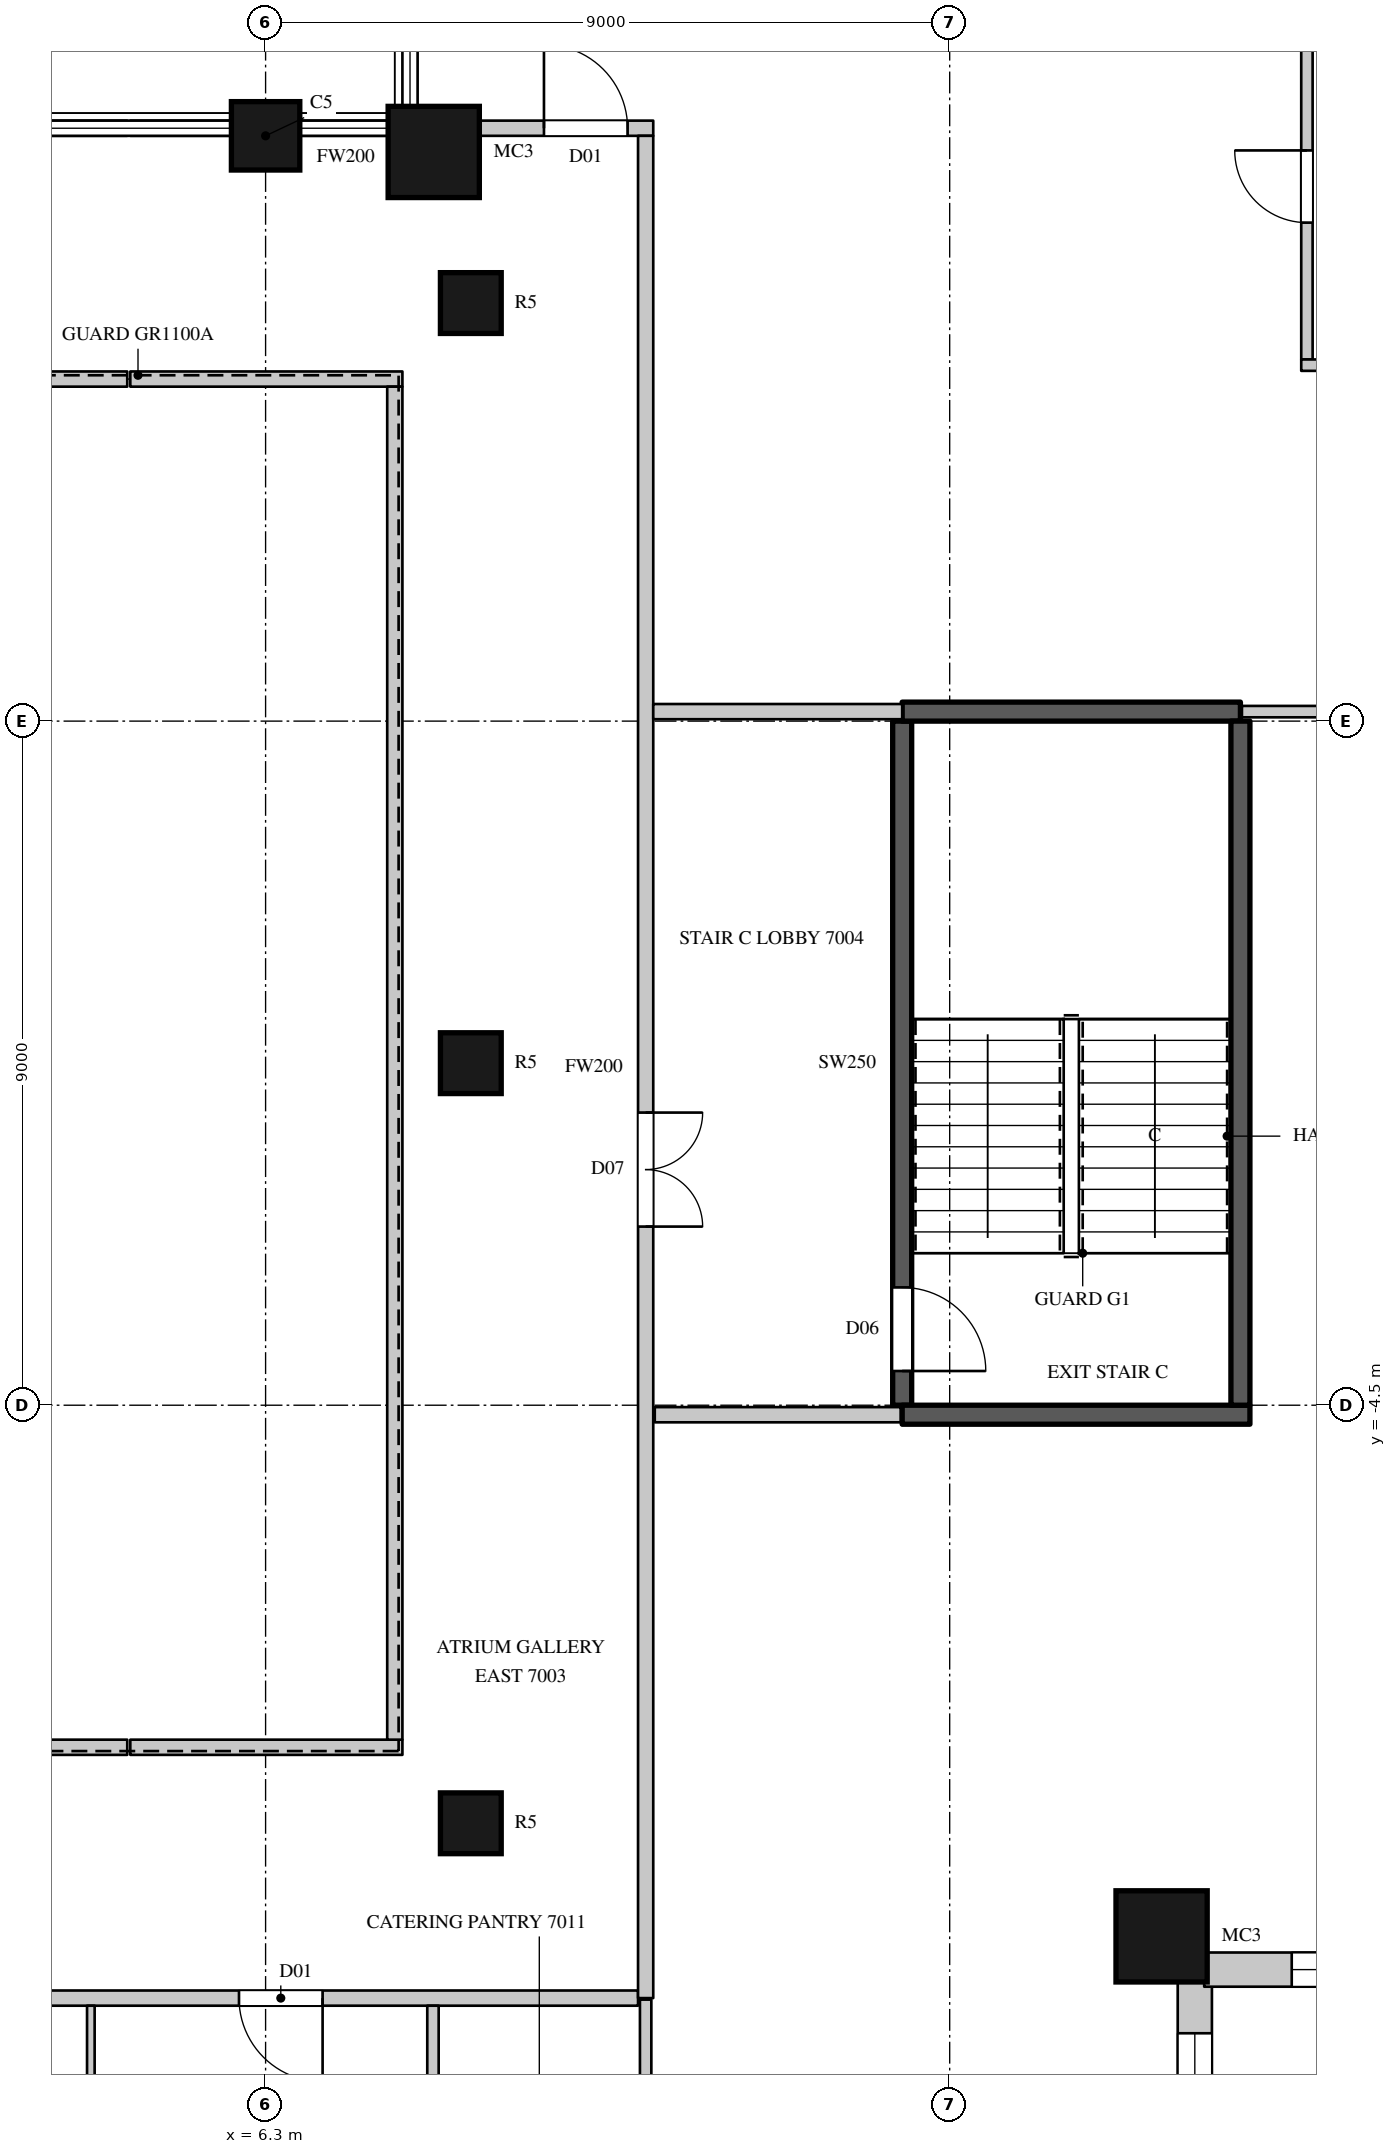
"""IFC4 building model, lengths in metres.
Left out: names, types, materials, properties, quantities, classifications, styles, units other than length and angle.
Written with IfcOpenShell. Run it as: python <this file> out.ifc"""

import sys

from ifc_helpers import new_model, si_unit, direction, frame, frame_2d, origin, origin_2d, place, context, subcontext, project, spatial, rectangle, circle, extrude, element, fill, save


model = new_model("IFC4")
c1 = context("Model", 3, precision=1e-05, world=origin(), true_north=direction((0.0, 1.0)))
c2 = subcontext(c1, "Body", "Model", "MODEL_VIEW")
j1 = project(units=[si_unit("LENGTHUNIT", "METRE"), si_unit("PLANEANGLEUNIT", "RADIAN")], contexts=[c1])
p1 = place(None, origin())
s1 = spatial("IfcSite", under=j1, at=p1, CompositionType="ELEMENT")
p2 = place(p1, origin())
s2 = spatial("IfcBuilding", under=s1, at=p2, CompositionType="ELEMENT")
p3 = place(p2, frame((0.0, 0.0, 309.0)))
s3 = spatial("IfcBuildingStorey", under=s2, at=p3, CompositionType="ELEMENT", Elevation=309.0)
p4 = place(p3, frame((8.512, 11.988, 0.0), z_axis=(0.0, 0.0, 1.0), x_axis=(1.0, 0.0, 0.0)))
e1 = element("IfcColumn", 1, at=p4, inside=s3, PredefinedType="COLUMN", context=c2, shape_type="SweptSolid", body=[
    extrude(circle(Radius=0.6, at=origin_2d()), origin(), (0.0, 0.0, 1.0), 4.1),
])
p5 = place(p3, frame((6.3, 12.2, 0.0), z_axis=(0.0, 0.0, 1.0), x_axis=(-1.0, 0.0, 0.0)))
e2 = element("IfcColumn", 2, at=p5, inside=s3, PredefinedType="COLUMN", context=c2, shape_type="SweptSolid", body=[
    extrude(rectangle(XDim=0.9, YDim=0.9, at=origin_2d()), origin(), (0.0, 0.0, 1.0), 4.1),
])
p6 = place(p3, frame((18.088, -11.488, 0.0), z_axis=(0.0, 0.0, 1.0), x_axis=(1.0, 0.0, 0.0)))
e3 = element("IfcColumn", 3, at=p6, inside=s3, PredefinedType="COLUMN", context=c2, shape_type="SweptSolid", body=[
    extrude(circle(Radius=0.6, at=origin_2d()), origin(), (0.0, 0.0, 1.0), 4.1),
])
for number, where, z_axis, x_axis in (
    (4, (9.0, -10.0, 0.0), (0.0, 0.0, 1.0), (1.0, 0.0, 0.0)),
    (5, (9.0, 0.0, 0.0), (0.0, 0.0, 1.0), (1.0, 0.0, 0.0)),
    (6, (9.0, 10.0, 0.0), (0.0, 0.0, 1.0), (1.0, 0.0, 0.0)),
):
    element("IfcColumn", number, at=place(p3, frame(where, z_axis=z_axis, x_axis=x_axis)), inside=s3, PredefinedType="COLUMN", context=c2, shape_type="SweptSolid", body=[
        extrude(circle(Radius=0.4, at=origin_2d()), origin(), (0.0, 0.0, 1.0), 4.1),
    ])
p7 = place(p3, frame((18.525, -16.304, 0.0), z_axis=(0.0, 0.0, 1.0), x_axis=(0.0, 1.0, 0.0)))
e7 = element("IfcWall", 7, at=p7, inside=s3, PredefinedType="SOLIDWALL", context=c2, shape_type="SweptSolid", body=[
    extrude(rectangle(XDim=4.255, YDim=0.45, at=frame_2d((2.128, 0.0))), origin(), (0.0, 0.0, 1.0), 3.8),
])
p8 = place(p7, frame((0.541, 0.0, 1.05)))
e8 = element("IfcOpeningElement", 8, at=p8, cuts=e7, PredefinedType="OPENING", context=c2, shape_type="SweptSolid", body=[
    extrude(rectangle(XDim=3.0, YDim=2.4, at=frame_2d((1.5, 1.2))), frame((0.0, 0.235, 0.0), z_axis=(0.0, -1.0, 0.0), x_axis=(1.0, 0.0, 0.0)), (0.0, 0.0, 1.0), 0.47),
])
p9 = place(p3, frame((18.648, -11.925, 0.0), z_axis=(0.0, 0.0, 1.0), x_axis=(1.0, 0.0, 0.0)))
e9 = element("IfcWall", 9, at=p9, inside=s3, PredefinedType="SOLIDWALL", context=c2, shape_type="SweptSolid", body=[
    extrude(rectangle(XDim=5.015, YDim=0.45, at=frame_2d((2.508, 0.0))), origin(), (0.0, 0.0, 1.0), 3.8),
])
p10 = place(p9, frame((1.152, 0.0, 1.05)))
e10 = element("IfcOpeningElement", 10, at=p10, cuts=e9, PredefinedType="OPENING", context=c2, shape_type="SweptSolid", body=[
    extrude(rectangle(XDim=3.0, YDim=2.4, at=frame_2d((1.5, 1.2))), frame((0.0, 0.235, 0.0), z_axis=(0.0, -1.0, 0.0), x_axis=(1.0, 0.0, 0.0)), (0.0, 0.0, 1.0), 0.47),
])
p11 = place(p3, frame((-10.9, -12.3, 0.0), z_axis=(0.0, 0.0, 1.0), x_axis=(1.0, 0.0, 0.0)))
e11 = element("IfcWall", 11, at=p11, inside=s3, PredefinedType="PARTITIONING", context=c2, shape_type="SweptSolid", body=[
    extrude(rectangle(XDim=22.1, YDim=0.2, at=frame_2d((11.05, 0.0))), origin(), (0.0, 0.0, 1.0), 3.8),
])
p12 = place(p11, frame((0.95, 0.0, 0.0)))
e12 = element("IfcOpeningElement", 12, at=p12, cuts=e11, PredefinedType="OPENING", context=c2, shape_type="SweptSolid", body=[
    extrude(rectangle(XDim=0.9, YDim=2.2, at=frame_2d((0.45, 1.1))), frame((0.0, 0.11, 0.0), z_axis=(0.0, -1.0, 0.0), x_axis=(1.0, 0.0, 0.0)), (0.0, 0.0, 1.0), 0.22),
])
p13 = place(p11, frame((3.95, 0.0, 0.0)))
e13 = element("IfcOpeningElement", 13, at=p13, cuts=e11, PredefinedType="OPENING", context=c2, shape_type="SweptSolid", body=[
    extrude(rectangle(XDim=0.9, YDim=2.2, at=frame_2d((0.45, 1.1))), frame((0.0, 0.11, 0.0), z_axis=(0.0, -1.0, 0.0), x_axis=(1.0, 0.0, 0.0)), (0.0, 0.0, 1.0), 0.22),
])
p14 = place(p11, frame((7.1, 0.0, 0.0)))
e14 = element("IfcOpeningElement", 14, at=p14, cuts=e11, PredefinedType="OPENING", context=c2, shape_type="SweptSolid", body=[
    extrude(rectangle(XDim=0.9, YDim=2.2, at=frame_2d((0.45, 1.1))), frame((0.0, 0.11, 0.0), z_axis=(0.0, -1.0, 0.0), x_axis=(1.0, 0.0, 0.0)), (0.0, 0.0, 1.0), 0.22),
])
p15 = place(p11, frame((10.0, 0.0, 0.0)))
e15 = element("IfcOpeningElement", 15, at=p15, cuts=e11, PredefinedType="OPENING", context=c2, shape_type="SweptSolid", body=[
    extrude(rectangle(XDim=0.9, YDim=2.2, at=frame_2d((0.45, 1.1))), frame((0.0, 0.11, 0.0), z_axis=(0.0, -1.0, 0.0), x_axis=(1.0, 0.0, 0.0)), (0.0, 0.0, 1.0), 0.22),
])
p16 = place(p11, frame((13.25, 0.0, 0.0)))
e16 = element("IfcOpeningElement", 16, at=p16, cuts=e11, PredefinedType="OPENING", context=c2, shape_type="SweptSolid", body=[
    extrude(rectangle(XDim=0.9, YDim=2.2, at=frame_2d((0.45, 1.1))), frame((0.0, 0.11, 0.0), z_axis=(0.0, -1.0, 0.0), x_axis=(1.0, 0.0, 0.0)), (0.0, 0.0, 1.0), 0.22),
])
p17 = place(p11, frame((16.85, 0.0, 0.0)))
e17 = element("IfcOpeningElement", 17, at=p17, cuts=e11, PredefinedType="OPENING", context=c2, shape_type="SweptSolid", body=[
    extrude(rectangle(XDim=1.1, YDim=2.4, at=frame_2d((0.55, 1.2))), frame((0.0, 0.11, 0.0), z_axis=(0.0, -1.0, 0.0), x_axis=(1.0, 0.0, 0.0)), (0.0, 0.0, 1.0), 0.22),
])
p18 = place(p3, frame((-2.25, 12.3, 0.0), z_axis=(0.0, 0.0, 1.0), x_axis=(1.0, 0.0, 0.0)))
e18 = element("IfcWall", 18, at=p18, inside=s3, PredefinedType="PARTITIONING", context=c2, shape_type="SweptSolid", body=[
    extrude(rectangle(XDim=6.73, YDim=0.2, at=frame_2d((3.365, 0.0))), origin(), (0.0, 0.0, 1.0), 3.8),
])
for number, where, z_axis, x_axis in (
    (19, (-6.1, -9.0, 0.0), (0.0, 0.0, 1.0), (1.0, 0.0, 0.0)),
    (20, (-6.1, 9.0, 0.0), (0.0, 0.0, 1.0), (1.0, 0.0, 0.0)),
):
    element("IfcWall", number, at=place(p3, frame(where, z_axis=z_axis, x_axis=x_axis)), inside=s3, PredefinedType="PARTITIONING", context=c2, shape_type="SweptSolid", body=[
        extrude(rectangle(XDim=10.58, YDim=0.2, at=frame_2d((5.29, 0.0))), origin(), (0.0, 0.0, 1.0), 3.8),
    ])
for number, where, z_axis, x_axis in (
    (21, (4.52, -9.0, 0.0), (0.0, 0.0, 1.0), (1.0, 0.0, 0.0)),
    (22, (4.52, 9.0, 0.0), (0.0, 0.0, 1.0), (1.0, 0.0, 0.0)),
):
    element("IfcWall", number, at=place(p3, frame(where, z_axis=z_axis, x_axis=x_axis)), inside=s3, PredefinedType="PARTITIONING", context=c2, shape_type="SweptSolid", body=[
        extrude(rectangle(XDim=3.58, YDim=0.2, at=frame_2d((1.79, 0.0))), origin(), (0.0, 0.0, 1.0), 3.8),
    ])
p19 = place(p3, frame((4.52, 12.3, 0.0), z_axis=(0.0, 0.0, 1.0), x_axis=(1.0, 0.0, 0.0)))
e23 = element("IfcWall", 23, at=p19, inside=s3, PredefinedType="PARTITIONING", context=c2, shape_type="SweptSolid", body=[
    extrude(rectangle(XDim=1.33, YDim=0.2, at=frame_2d((0.665, 0.0))), origin(), (0.0, 0.0, 1.0), 3.8),
])
p20 = place(p3, frame((6.75, 12.3, 0.0), z_axis=(0.0, 0.0, 1.0), x_axis=(1.0, 0.0, 0.0)))
e24 = element("IfcWall", 24, at=p20, inside=s3, PredefinedType="PARTITIONING", context=c2, shape_type="SweptSolid", body=[
    extrude(rectangle(XDim=1.212, YDim=0.2, at=frame_2d((0.606, 0.0))), origin(), (0.0, 0.0, 1.0), 3.8),
])
p21 = place(p3, frame((8.0, -8.9, 0.0), z_axis=(0.0, 0.0, 1.0), x_axis=(0.0, 1.0, 0.0)))
e25 = element("IfcWall", 25, at=p21, inside=s3, PredefinedType="PARTITIONING", context=c2, shape_type="SweptSolid", body=[
    extrude(rectangle(XDim=17.8, YDim=0.2, at=frame_2d((8.9, 0.0))), origin(), (0.0, 0.0, 1.0), 3.8),
])
p22 = place(p3, frame((9.062, 12.3, 0.0), z_axis=(0.0, 0.0, 1.0), x_axis=(1.0, 0.0, 0.0)))
e26 = element("IfcWall", 26, at=p22, inside=s3, PredefinedType="PARTITIONING", context=c2, shape_type="SweptSolid", body=[
    extrude(rectangle(XDim=2.338, YDim=0.2, at=frame_2d((1.169, 0.0))), origin(), (0.0, 0.0, 1.0), 3.8),
])
p23 = place(p22, frame((0.9, 0.0, 0.0)))
e27 = element("IfcOpeningElement", 27, at=p23, cuts=e26, PredefinedType="OPENING", context=c2, shape_type="SweptSolid", body=[
    extrude(rectangle(XDim=1.1, YDim=2.4, at=frame_2d((0.55, 1.2))), frame((0.0, 0.11, 0.0), z_axis=(0.0, -1.0, 0.0), x_axis=(1.0, 0.0, 0.0)), (0.0, 0.0, 1.0), 0.22),
])
p24 = place(p3, frame((11.3, -12.3, 0.0), z_axis=(0.0, 0.0, 1.0), x_axis=(0.0, 1.0, 0.0)))
e28 = element("IfcWall", 28, at=p24, inside=s3, PredefinedType="PARTITIONING", context=c2, shape_type="SweptSolid", body=[
    extrude(rectangle(XDim=24.5, YDim=0.2, at=frame_2d((12.25, 0.0))), origin(), (0.0, 0.0, 1.0), 3.8),
])
p25 = place(p24, frame((10.15, 0.0, 0.0)))
e29 = element("IfcOpeningElement", 29, at=p25, cuts=e28, PredefinedType="OPENING", context=c2, shape_type="SweptSolid", body=[
    extrude(rectangle(XDim=1.5, YDim=2.4, at=frame_2d((0.75, 1.2))), frame((0.0, 0.11, 0.0), z_axis=(0.0, -1.0, 0.0), x_axis=(1.0, 0.0, 0.0)), (0.0, 0.0, 1.0), 0.22),
])
p26 = place(p3, frame((11.4, 4.625, 0.0), z_axis=(0.0, 0.0, 1.0), x_axis=(1.0, 0.0, 0.0)))
e30 = element("IfcWall", 30, at=p26, inside=s3, PredefinedType="PARTITIONING", context=c2, shape_type="SweptSolid", body=[
    extrude(rectangle(XDim=3.275, YDim=0.2, at=frame_2d((1.638, 0.0))), origin(), (0.0, 0.0, 1.0), 3.8),
])
p27 = place(p3, frame((11.42, -4.625, 0.0), z_axis=(0.0, 0.0, 1.0), x_axis=(1.0, 0.0, 0.0)))
e31 = element("IfcWall", 31, at=p27, inside=s3, PredefinedType="PARTITIONING", context=c2, shape_type="SweptSolid", body=[
    extrude(rectangle(XDim=3.235, YDim=0.2, at=frame_2d((1.618, 0.0))), origin(), (0.0, 0.0, 1.0), 3.8),
])
p28 = place(p3, frame((8.502, -16.425, 0.0), z_axis=(0.0, 0.0, 1.0), x_axis=(0.0, 1.0, 0.0)))
e32 = element("IfcWall", 32, at=p28, inside=s3, PredefinedType="PARTITIONING", context=c2, shape_type="SweptSolid", body=[
    extrude(rectangle(XDim=4.025, YDim=0.15, at=frame_2d((2.013, 0.0))), origin(), (0.0, 0.0, 1.0), 3.8),
])
p29 = place(p28, frame((1.55, 0.0, 0.0)))
e33 = element("IfcOpeningElement", 33, at=p29, cuts=e32, PredefinedType="OPENING", context=c2, shape_type="SweptSolid", body=[
    extrude(rectangle(XDim=0.95, YDim=2.2, at=frame_2d((0.475, 1.1))), frame((0.0, 0.085, 0.0), z_axis=(0.0, -1.0, 0.0), x_axis=(1.0, 0.0, 0.0)), (0.0, 0.0, 1.0), 0.17),
])
p30 = place(p3, frame((11.3, -16.5, 0.0), z_axis=(0.0, 0.0, 1.0), x_axis=(0.0, 1.0, 0.0)))
e34 = element("IfcWall", 34, at=p30, inside=s3, PredefinedType="PARTITIONING", context=c2, shape_type="SweptSolid", body=[
    extrude(rectangle(XDim=4.18, YDim=0.15, at=frame_2d((2.09, 0.0))), origin(), (0.0, 0.0, 1.0), 3.8),
])
p31 = place(p3, frame((19.145, 4.625, 0.0), z_axis=(0.0, 0.0, 1.0), x_axis=(1.0, 0.0, 0.0)))
e35 = element("IfcWall", 35, at=p31, inside=s3, PredefinedType="PARTITIONING", context=c2, shape_type="SweptSolid", body=[
    extrude(rectangle(XDim=4.705, YDim=0.15, at=frame_2d((2.353, 0.0))), origin(), (0.0, 0.0, 1.0), 3.8),
])
p32 = place(p3, frame((20.0, 9.258, 0.0), z_axis=(0.0, 0.0, 1.0), x_axis=(0.0, 1.0, 0.0)))
e36 = element("IfcWall", 36, at=p32, inside=s3, PredefinedType="PARTITIONING", context=c2, shape_type="SweptSolid", body=[
    extrude(rectangle(XDim=4.532, YDim=0.15, at=frame_2d((2.266, 0.0))), origin(), (0.0, 0.0, 1.0), 3.8),
])
p33 = place(p32, frame((1.8, 0.0, 0.0)))
e37 = element("IfcOpeningElement", 37, at=p33, cuts=e36, PredefinedType="OPENING", context=c2, shape_type="SweptSolid", body=[
    extrude(rectangle(XDim=0.95, YDim=2.2, at=frame_2d((0.475, 1.1))), frame((0.0, 0.085, 0.0), z_axis=(0.0, -1.0, 0.0), x_axis=(1.0, 0.0, 0.0)), (0.0, 0.0, 1.0), 0.17),
])
p34 = place(p3, frame((19.925, 9.183, 0.0), z_axis=(0.0, 0.0, 1.0), x_axis=(1.0, 0.0, 0.0)))
e38 = element("IfcWall", 38, at=p34, inside=s3, PredefinedType="PARTITIONING", context=c2, shape_type="SweptSolid", body=[
    extrude(rectangle(XDim=4.375, YDim=0.15, at=frame_2d((2.188, 0.0))), origin(), (0.0, 0.0, 1.0), 3.15),
])
p35 = place(p3, frame((14.675, -4.5, 0.0), z_axis=(0.0, 0.0, 1.0), x_axis=(0.0, 1.0, 0.0)))
e39 = element("IfcWall", 39, at=p35, inside=s3, PredefinedType="SHEAR", context=c2, shape_type="SweptSolid", body=[
    extrude(rectangle(XDim=9.0, YDim=0.25, at=frame_2d((4.5, 0.0))), origin(), (0.0, 0.0, 1.0), 3.8),
])
p36 = place(p35, frame((0.45, 0.0, 0.0)))
e40 = element("IfcOpeningElement", 40, at=p36, cuts=e39, PredefinedType="OPENING", context=c2, shape_type="SweptSolid", body=[
    extrude(rectangle(XDim=1.1, YDim=2.2, at=frame_2d((0.55, 1.1))), frame((0.0, 0.135, 0.0), z_axis=(0.0, -1.0, 0.0), x_axis=(1.0, 0.0, 0.0)), (0.0, 0.0, 1.0), 0.27),
])
p37 = place(p3, frame((14.675, -4.625, 0.0), z_axis=(0.0, 0.0, 1.0), x_axis=(1.0, 0.0, 0.0)))
e41 = element("IfcWall", 41, at=p37, inside=s3, PredefinedType="SHEAR", context=c2, shape_type="SweptSolid", body=[
    extrude(rectangle(XDim=4.575, YDim=0.25, at=frame_2d((2.288, 0.0))), origin(), (0.0, 0.0, 1.0), 3.8),
])
p38 = place(p3, frame((14.675, 4.625, 0.0), z_axis=(0.0, 0.0, 1.0), x_axis=(1.0, 0.0, 0.0)))
e42 = element("IfcWall", 42, at=p38, inside=s3, PredefinedType="SHEAR", context=c2, shape_type="SweptSolid", body=[
    extrude(rectangle(XDim=4.45, YDim=0.25, at=frame_2d((2.225, 0.0))), origin(), (0.0, 0.0, 1.0), 3.8),
])
p39 = place(p3, frame((19.125, -4.5, 0.0), z_axis=(0.0, 0.0, 1.0), x_axis=(0.0, 1.0, 0.0)))
e43 = element("IfcWall", 43, at=p39, inside=s3, PredefinedType="SHEAR", context=c2, shape_type="SweptSolid", body=[
    extrude(rectangle(XDim=9.0, YDim=0.25, at=frame_2d((4.5, 0.0))), origin(), (0.0, 0.0, 1.0), 3.8),
])
p40 = place(p3, frame((4.001, -22.999, 0.0), z_axis=(0.0, 0.0, 1.0), x_axis=(0.0, 1.0, 0.0)))
e44 = element("IfcWall", 44, at=p40, inside=s3, PredefinedType="PARTITIONING", context=c2, shape_type="SweptSolid", body=[
    extrude(rectangle(XDim=10.599, YDim=0.1, at=frame_2d((5.3, 0.0))), origin(), (0.0, 0.0, 1.0), 3.8),
])
p41 = place(p8, origin())
e45 = element("IfcWindow", 45, at=p41, inside=s3, PartitioningType="SINGLE_PANEL", PredefinedType="WINDOW", context=c2, shape_type="SweptSolid", body=[
    extrude(rectangle(XDim=3.0, YDim=2.4, at=frame_2d((1.5, 1.2))), frame((0.0, 0.135, 0.0), z_axis=(0.0, -1.0, 0.0), x_axis=(1.0, 0.0, 0.0)), (0.0, 0.0, 1.0), 0.06),
])
fill(e8, e45)
p42 = place(p10, origin())
e46 = element("IfcWindow", 46, at=p42, inside=s3, PartitioningType="SINGLE_PANEL", PredefinedType="WINDOW", context=c2, shape_type="SweptSolid", body=[
    extrude(rectangle(XDim=3.0, YDim=2.4, at=frame_2d((1.5, 1.2))), frame((0.0, 0.135, 0.0), z_axis=(0.0, -1.0, 0.0), x_axis=(1.0, 0.0, 0.0)), (0.0, 0.0, 1.0), 0.06),
])
fill(e10, e46)
p43 = place(p25, origin())
e47 = element("IfcDoor", 47, at=p43, inside=s3, OperationType="DOUBLE_DOOR_SINGLE_SWING", PredefinedType="DOOR", context=c2, shape_type="SweptSolid", body=[
    extrude(rectangle(XDim=1.5, YDim=2.4, at=frame_2d((0.75, 1.2))), frame((0.0, 0.025, 0.0), z_axis=(0.0, -1.0, 0.0), x_axis=(1.0, 0.0, 0.0)), (0.0, 0.0, 1.0), 0.05),
])
fill(e29, e47)
p44 = place(p17, origin())
e48 = element("IfcDoor", 48, at=p44, inside=s3, OperationType="SINGLE_SWING_LEFT", PredefinedType="DOOR", context=c2, shape_type="SweptSolid", body=[
    extrude(rectangle(XDim=1.1, YDim=2.4, at=frame_2d((0.55, 1.2))), frame((0.0, 0.025, 0.0), z_axis=(0.0, -1.0, 0.0), x_axis=(1.0, 0.0, 0.0)), (0.0, 0.0, 1.0), 0.05),
])
fill(e17, e48)
p45 = place(p23, origin())
e49 = element("IfcDoor", 49, at=p45, inside=s3, OperationType="SINGLE_SWING_LEFT", PredefinedType="DOOR", context=c2, shape_type="SweptSolid", body=[
    extrude(rectangle(XDim=1.1, YDim=2.4, at=frame_2d((0.55, 1.2))), frame((0.0, 0.025, 0.0), z_axis=(0.0, -1.0, 0.0), x_axis=(1.0, 0.0, 0.0)), (0.0, 0.0, 1.0), 0.05),
])
fill(e27, e49)
p46 = place(p33, origin())
e50 = element("IfcDoor", 50, at=p46, inside=s3, OperationType="SINGLE_SWING_RIGHT", PredefinedType="DOOR", context=c2, shape_type="SweptSolid", body=[
    extrude(rectangle(XDim=0.95, YDim=2.2, at=frame_2d((0.475, 1.1))), frame((0.0, 0.025, 0.0), z_axis=(0.0, -1.0, 0.0), x_axis=(1.0, 0.0, 0.0)), (0.0, 0.0, 1.0), 0.05),
])
fill(e37, e50)
p47 = place(p36, origin())
e51 = element("IfcDoor", 51, at=p47, inside=s3, OperationType="SINGLE_SWING_RIGHT", PredefinedType="DOOR", context=c2, shape_type="SweptSolid", body=[
    extrude(rectangle(XDim=1.1, YDim=2.2, at=frame_2d((0.55, 1.1))), frame((0.0, 0.025, 0.0), z_axis=(0.0, -1.0, 0.0), x_axis=(1.0, 0.0, 0.0)), (0.0, 0.0, 1.0), 0.05),
])
fill(e40, e51)
save(model, sys.argv[1])
